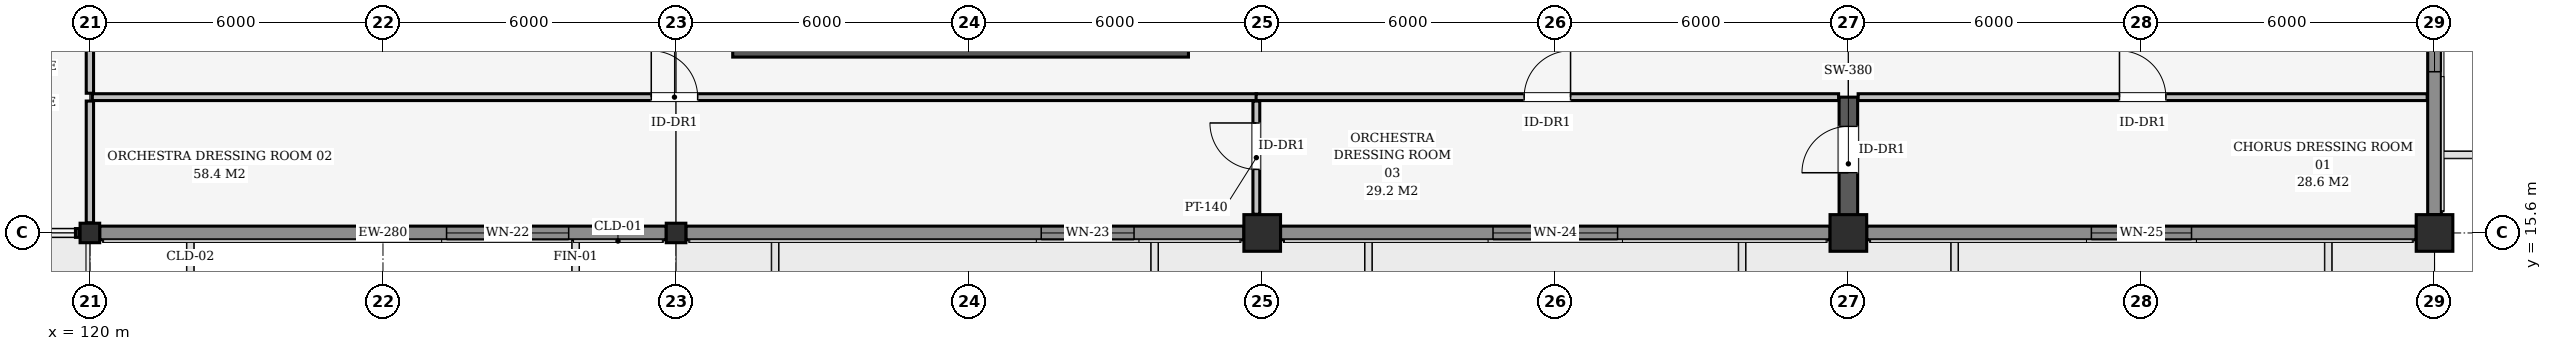
"""IFC4 building model, lengths in metres.
Left out: names, types, materials, properties, quantities, classifications, styles, units other than length and angle.
Written with IfcOpenShell. Run it as: python <this file> out.ifc"""

import sys

from ifc_helpers import new_model, si_unit, direction, frame, frame_2d, origin, origin_2d, place, context, subcontext, project, spatial, rectangle, i_section, extrude, element, fill, save


model = new_model("IFC4")
c1 = context("Model", 3, precision=1e-05, world=origin(), true_north=direction((0.0, 1.0)))
c2 = subcontext(c1, "Body", "Model", "MODEL_VIEW")
j1 = project(units=[si_unit("LENGTHUNIT", "METRE"), si_unit("PLANEANGLEUNIT", "RADIAN")], contexts=[c1])
p1 = place(None, origin())
s1 = spatial("IfcSite", under=j1, at=p1, CompositionType="ELEMENT")
p2 = place(p1, origin())
s2 = spatial("IfcBuilding", under=s1, at=p2, CompositionType="ELEMENT")
p3 = place(p2, frame((0.0, 0.0, 4.8)))
s3 = spatial("IfcBuildingStorey", under=s2, at=p3, CompositionType="ELEMENT", Elevation=4.8)
for number, where, z_axis, x_axis in (
    (1, (120.0, 15.6, 0.0), (0.0, 0.0, 1.0), (1.0, 0.0, 0.0)),
    (2, (132.0, 15.6, 0.0), (0.0, 0.0, 1.0), (1.0, 0.0, 0.0)),
):
    element("IfcColumn", number, at=place(p3, frame(where, z_axis=z_axis, x_axis=x_axis)), inside=s3, PredefinedType="COLUMN", context=c2, shape_type="SweptSolid", body=[
        extrude(i_section(OverallWidth=0.401, OverallDepth=0.399, WebThickness=0.025, FlangeThickness=0.04, at=origin_2d()), origin(), (0.0, 0.0, 1.0), 4.5),
    ])
for number, where, z_axis, x_axis in (
    (3, (144.0, 15.6, 0.0), (0.0, 0.0, 1.0), (1.0, 0.0, 0.0)),
    (4, (156.0, 15.6, 0.0), (0.0, 0.0, 1.0), (1.0, 0.0, 0.0)),
    (5, (168.0, 15.6, 0.0), (0.0, 0.0, 1.0), (1.0, 0.0, 0.0)),
):
    element("IfcColumn", number, at=place(p3, frame(where, z_axis=z_axis, x_axis=x_axis)), inside=s3, PredefinedType="COLUMN", context=c2, shape_type="SweptSolid", body=[
        extrude(rectangle(XDim=0.75, YDim=0.75, at=origin_2d()), origin(), (0.0, 0.0, 1.0), 4.5),
    ])
p4 = place(p3, frame((156.0, 15.65, 0.0), z_axis=(0.0, 0.0, 1.0), x_axis=(0.0, 1.0, 0.0)))
e6 = element("IfcWall", 6, at=p4, inside=s3, PredefinedType="SHEAR", context=c2, shape_type="SweptSolid", body=[
    extrude(rectangle(XDim=2.73, YDim=0.38, at=frame_2d((1.365, 0.0))), origin(), (0.0, 0.0, 1.0), 3.37),
])
p5 = place(p4, frame((1.183, 0.0, 0.0)))
e7 = element("IfcOpeningElement", 7, at=p5, cuts=e6, PredefinedType="OPENING", context=c2, shape_type="SweptSolid", body=[
    extrude(rectangle(XDim=0.95, YDim=2.12, at=frame_2d((0.475, 1.06))), frame((0.0, 0.2, 0.0), z_axis=(0.0, -1.0, 0.0), x_axis=(1.0, 0.0, 0.0)), (0.0, 0.0, 1.0), 0.4),
])
p6 = place(p3, frame((131.8, 15.6, 0.0), z_axis=(0.0, 0.0, 1.0), x_axis=(-1.0, 0.0, 0.0)))
e8 = element("IfcWall", 8, at=p6, inside=s3, PredefinedType="SOLIDWALL", context=c2, shape_type="SweptSolid", body=[
    extrude(rectangle(XDim=11.599, YDim=0.28, at=frame_2d((5.8, 0.0))), origin(), (0.0, 0.0, 1.0), 3.507),
])
p7 = place(p6, frame((1.998, 0.0, 0.85)))
e9 = element("IfcOpeningElement", 9, at=p7, cuts=e8, PredefinedType="OPENING", context=c2, shape_type="SweptSolid", body=[
    extrude(rectangle(XDim=2.5, YDim=1.9, at=frame_2d((1.25, 0.95))), frame((0.0, 0.15, 0.0), z_axis=(0.0, -1.0, 0.0), x_axis=(1.0, 0.0, 0.0)), (0.0, 0.0, 1.0), 0.3),
])
p8 = place(p3, frame((143.625, 15.6, 0.0), z_axis=(0.0, 0.0, 1.0), x_axis=(-1.0, 0.0, 0.0)))
e10 = element("IfcWall", 10, at=p8, inside=s3, PredefinedType="SOLIDWALL", context=c2, shape_type="SweptSolid", body=[
    extrude(rectangle(XDim=11.425, YDim=0.28, at=frame_2d((5.712, 0.0))), origin(), (0.0, 0.0, 1.0), 3.507),
])
p9 = place(p8, frame((2.249, 0.0, 0.85)))
e11 = element("IfcOpeningElement", 11, at=p9, cuts=e10, PredefinedType="OPENING", context=c2, shape_type="SweptSolid", body=[
    extrude(rectangle(XDim=1.9, YDim=1.6, at=frame_2d((0.95, 0.8))), frame((0.0, 0.15, 0.0), z_axis=(0.0, -1.0, 0.0), x_axis=(1.0, 0.0, 0.0)), (0.0, 0.0, 1.0), 0.3),
])
p10 = place(p3, frame((155.625, 15.6, 0.0), z_axis=(0.0, 0.0, 1.0), x_axis=(-1.0, 0.0, 0.0)))
e12 = element("IfcWall", 12, at=p10, inside=s3, PredefinedType="SOLIDWALL", context=c2, shape_type="SweptSolid", body=[
    extrude(rectangle(XDim=11.25, YDim=0.28, at=frame_2d((5.625, 0.0))), origin(), (0.0, 0.0, 1.0), 3.507),
])
p11 = place(p10, frame((4.35, 0.0, 0.85)))
e13 = element("IfcOpeningElement", 13, at=p11, cuts=e12, PredefinedType="OPENING", context=c2, shape_type="SweptSolid", body=[
    extrude(rectangle(XDim=2.55, YDim=1.05, at=frame_2d((1.275, 0.525))), frame((0.0, 0.15, 0.0), z_axis=(0.0, -1.0, 0.0), x_axis=(1.0, 0.0, 0.0)), (0.0, 0.0, 1.0), 0.3),
])
p12 = place(p3, frame((167.625, 15.6, 0.0), z_axis=(0.0, 0.0, 1.0), x_axis=(-1.0, 0.0, 0.0)))
e14 = element("IfcWall", 14, at=p12, inside=s3, PredefinedType="SOLIDWALL", context=c2, shape_type="SweptSolid", body=[
    extrude(rectangle(XDim=11.25, YDim=0.28, at=frame_2d((5.625, 0.0))), origin(), (0.0, 0.0, 1.0), 3.507),
])
p13 = place(p12, frame((4.6, 0.0, 0.85)))
e15 = element("IfcOpeningElement", 15, at=p13, cuts=e14, PredefinedType="OPENING", context=c2, shape_type="SweptSolid", body=[
    extrude(rectangle(XDim=2.05, YDim=1.5, at=frame_2d((1.025, 0.75))), frame((0.0, 0.15, 0.0), z_axis=(0.0, -1.0, 0.0), x_axis=(1.0, 0.0, 0.0)), (0.0, 0.0, 1.0), 0.3),
])
p14 = place(p3, frame((168.0, 23.625, 0.0), z_axis=(0.0, 0.0, 1.0), x_axis=(0.0, -1.0, 0.0)))
e16 = element("IfcWall", 16, at=p14, inside=s3, PredefinedType="SOLIDWALL", context=c2, shape_type="SweptSolid", body=[
    extrude(rectangle(XDim=7.65, YDim=0.28, at=frame_2d((3.825, 0.0))), origin(), (0.0, 0.0, 1.0), 3.588),
])
p15 = place(p14, frame((2.925, 0.0, 0.85)))
e17 = element("IfcOpeningElement", 17, at=p15, cuts=e16, PredefinedType="OPENING", context=c2, shape_type="SweptSolid", body=[
    extrude(rectangle(XDim=1.8, YDim=1.65, at=frame_2d((0.9, 0.825))), frame((0.0, 0.15, 0.0), z_axis=(0.0, -1.0, 0.0), x_axis=(1.0, 0.0, 0.0)), (0.0, 0.0, 1.0), 0.3),
])
p16 = place(p3, frame((133.16, 19.345, 0.0), z_axis=(0.0, 0.0, 1.0), x_axis=(1.0, 0.0, 0.0)))
e18 = element("IfcWall", 18, at=p16, inside=s3, PredefinedType="SHEAR", context=c2, shape_type="SweptSolid", body=[
    extrude(rectangle(XDim=9.33, YDim=0.29, at=frame_2d((4.665, 0.0))), origin(), (0.0, 0.0, 1.0), 4.22),
])
p17 = place(p3, frame((120.05, 18.38, 0.0), z_axis=(0.0, 0.0, 1.0), x_axis=(1.0, 0.0, 0.0)))
e19 = element("IfcWall", 19, at=p17, inside=s3, PredefinedType="PARTITIONING", context=c2, shape_type="SweptSolid", body=[
    extrude(rectangle(XDim=23.835, YDim=0.14, at=frame_2d((11.917, 0.0))), origin(), (0.0, 0.0, 1.0), 4.2),
])
p18 = place(p17, frame((11.442, 0.0, 0.0)))
e20 = element("IfcOpeningElement", 20, at=p18, cuts=e19, PredefinedType="OPENING", context=c2, shape_type="SweptSolid", body=[
    extrude(rectangle(XDim=0.95, YDim=2.12, at=frame_2d((0.475, 1.06))), frame((0.0, 0.08, 0.0), z_axis=(0.0, -1.0, 0.0), x_axis=(1.0, 0.0, 0.0)), (0.0, 0.0, 1.0), 0.16),
])
p19 = place(p3, frame((143.875, 18.38, 0.0), z_axis=(0.0, 0.0, 1.0), x_axis=(1.0, 0.0, 0.0)))
e21 = element("IfcWall", 21, at=p19, inside=s3, PredefinedType="PARTITIONING", context=c2, shape_type="SweptSolid", body=[
    extrude(rectangle(XDim=11.925, YDim=0.14, at=frame_2d((5.962, 0.0))), origin(), (0.0, 0.0, 1.0), 4.2),
])
p20 = place(p19, frame((5.488, 0.0, 0.0)))
e22 = element("IfcOpeningElement", 22, at=p20, cuts=e21, PredefinedType="OPENING", context=c2, shape_type="SweptSolid", body=[
    extrude(rectangle(XDim=0.95, YDim=2.12, at=frame_2d((0.475, 1.06))), frame((0.0, 0.08, 0.0), z_axis=(0.0, -1.0, 0.0), x_axis=(1.0, 0.0, 0.0)), (0.0, 0.0, 1.0), 0.16),
])
p21 = place(p3, frame((156.2, 18.38, 0.0), z_axis=(0.0, 0.0, 1.0), x_axis=(1.0, 0.0, 0.0)))
e23 = element("IfcWall", 23, at=p21, inside=s3, PredefinedType="PARTITIONING", context=c2, shape_type="SweptSolid", body=[
    extrude(rectangle(XDim=11.65, YDim=0.14, at=frame_2d((5.825, 0.0))), origin(), (0.0, 0.0, 1.0), 4.2),
])
p22 = place(p21, frame((5.35, 0.0, 0.0)))
e24 = element("IfcOpeningElement", 24, at=p22, cuts=e23, PredefinedType="OPENING", context=c2, shape_type="SweptSolid", body=[
    extrude(rectangle(XDim=0.95, YDim=2.12, at=frame_2d((0.475, 1.06))), frame((0.0, 0.08, 0.0), z_axis=(0.0, -1.0, 0.0), x_axis=(1.0, 0.0, 0.0)), (0.0, 0.0, 1.0), 0.16),
])
p23 = place(p3, frame((120.0, 18.46, 0.0), z_axis=(0.0, 0.0, 1.0), x_axis=(0.0, 1.0, 0.0)))
e25 = element("IfcWall", 25, at=p23, inside=s3, PredefinedType="PARTITIONING", context=c2, shape_type="SweptSolid", body=[
    extrude(rectangle(XDim=5.335, YDim=0.15, at=frame_2d((2.667, 0.0))), origin(), (0.0, 0.0, 1.0), 3.588),
])
p24 = place(p23, frame((2.198, 0.0, 0.0)))
e26 = element("IfcOpeningElement", 26, at=p24, cuts=e25, PredefinedType="OPENING", context=c2, shape_type="SweptSolid", body=[
    extrude(rectangle(XDim=0.94, YDim=2.1, at=frame_2d((0.47, 1.05))), frame((0.0, 0.085, 0.0), z_axis=(0.0, -1.0, 0.0), x_axis=(1.0, 0.0, 0.0)), (0.0, 0.0, 1.0), 0.17),
])
p25 = place(p3, frame((143.88, 15.983, 0.0), z_axis=(0.0, 0.0, 1.0), x_axis=(0.0, 1.0, 0.0)))
e27 = element("IfcWall", 27, at=p25, inside=s3, PredefinedType="PARTITIONING", context=c2, shape_type="SweptSolid", body=[
    extrude(rectangle(XDim=2.317, YDim=0.14, at=frame_2d((1.159, 0.0))), origin(), (0.0, 0.0, 1.0), 3.589),
])
p26 = place(p25, frame((0.918, 0.0, 0.0)))
e28 = element("IfcOpeningElement", 28, at=p26, cuts=e27, PredefinedType="OPENING", context=c2, shape_type="SweptSolid", body=[
    extrude(rectangle(XDim=0.95, YDim=2.12, at=frame_2d((0.475, 1.06))), frame((0.0, 0.08, 0.0), z_axis=(0.0, -1.0, 0.0), x_axis=(1.0, 0.0, 0.0)), (0.0, 0.0, 1.0), 0.16),
])
p27 = place(p3, frame((120.0, 15.808, 0.0), z_axis=(0.0, 0.0, 1.0), x_axis=(0.0, 1.0, 0.0)))
e29 = element("IfcWall", 29, at=p27, inside=s3, PredefinedType="PARTITIONING", context=c2, shape_type="SweptSolid", body=[
    extrude(rectangle(XDim=2.492, YDim=0.15, at=frame_2d((1.246, 0.0))), origin(), (0.0, 0.0, 1.0), 3.588),
])
p28 = place(p7, origin())
e30 = element("IfcWindow", 30, at=p28, inside=s3, PartitioningType="SINGLE_PANEL", PredefinedType="WINDOW", context=c2, shape_type="SweptSolid", body=[
    extrude(rectangle(XDim=2.5, YDim=1.9, at=frame_2d((1.25, 0.95))), frame((0.0, 0.03, 0.0), z_axis=(0.0, -1.0, 0.0), x_axis=(1.0, 0.0, 0.0)), (0.0, 0.0, 1.0), 0.06),
])
fill(e9, e30)
p29 = place(p9, origin())
e31 = element("IfcWindow", 31, at=p29, inside=s3, PartitioningType="SINGLE_PANEL", PredefinedType="WINDOW", context=c2, shape_type="SweptSolid", body=[
    extrude(rectangle(XDim=1.9, YDim=1.6, at=frame_2d((0.95, 0.8))), frame((0.0, 0.03, 0.0), z_axis=(0.0, -1.0, 0.0), x_axis=(1.0, 0.0, 0.0)), (0.0, 0.0, 1.0), 0.06),
])
fill(e11, e31)
p30 = place(p11, origin())
e32 = element("IfcWindow", 32, at=p30, inside=s3, PartitioningType="SINGLE_PANEL", PredefinedType="WINDOW", context=c2, shape_type="SweptSolid", body=[
    extrude(rectangle(XDim=2.55, YDim=1.05, at=frame_2d((1.275, 0.525))), frame((0.0, 0.03, 0.0), z_axis=(0.0, -1.0, 0.0), x_axis=(1.0, 0.0, 0.0)), (0.0, 0.0, 1.0), 0.06),
])
fill(e13, e32)
p31 = place(p13, origin())
e33 = element("IfcWindow", 33, at=p31, inside=s3, PartitioningType="SINGLE_PANEL", PredefinedType="WINDOW", context=c2, shape_type="SweptSolid", body=[
    extrude(rectangle(XDim=2.05, YDim=1.5, at=frame_2d((1.025, 0.75))), frame((0.0, 0.03, 0.0), z_axis=(0.0, -1.0, 0.0), x_axis=(1.0, 0.0, 0.0)), (0.0, 0.0, 1.0), 0.06),
])
fill(e15, e33)
p32 = place(p15, origin())
e34 = element("IfcWindow", 34, at=p32, inside=s3, PartitioningType="SINGLE_PANEL", PredefinedType="WINDOW", context=c2, shape_type="SweptSolid", body=[
    extrude(rectangle(XDim=1.8, YDim=1.65, at=frame_2d((0.9, 0.825))), frame((0.0, 0.03, 0.0), z_axis=(0.0, -1.0, 0.0), x_axis=(1.0, 0.0, 0.0)), (0.0, 0.0, 1.0), 0.06),
])
fill(e17, e34)
p33 = place(p18, origin())
e35 = element("IfcDoor", 35, at=p33, inside=s3, OperationType="SINGLE_SWING_LEFT", PredefinedType="DOOR", context=c2, shape_type="SweptSolid", body=[
    extrude(rectangle(XDim=0.95, YDim=2.12, at=frame_2d((0.475, 1.06))), frame((0.0, 0.025, 0.0), z_axis=(0.0, -1.0, 0.0), x_axis=(1.0, 0.0, 0.0)), (0.0, 0.0, 1.0), 0.05),
])
fill(e20, e35)
p34 = place(p20, origin())
e36 = element("IfcDoor", 36, at=p34, inside=s3, OperationType="SINGLE_SWING_RIGHT", PredefinedType="DOOR", context=c2, shape_type="SweptSolid", body=[
    extrude(rectangle(XDim=0.95, YDim=2.12, at=frame_2d((0.475, 1.06))), frame((0.0, 0.025, 0.0), z_axis=(0.0, -1.0, 0.0), x_axis=(1.0, 0.0, 0.0)), (0.0, 0.0, 1.0), 0.05),
])
fill(e22, e36)
p35 = place(p22, origin())
e37 = element("IfcDoor", 37, at=p35, inside=s3, OperationType="SINGLE_SWING_LEFT", PredefinedType="DOOR", context=c2, shape_type="SweptSolid", body=[
    extrude(rectangle(XDim=0.95, YDim=2.12, at=frame_2d((0.475, 1.06))), frame((0.0, 0.025, 0.0), z_axis=(0.0, -1.0, 0.0), x_axis=(1.0, 0.0, 0.0)), (0.0, 0.0, 1.0), 0.05),
])
fill(e24, e37)
p36 = place(p26, origin())
e38 = element("IfcDoor", 38, at=p36, inside=s3, OperationType="SINGLE_SWING_RIGHT", PredefinedType="DOOR", context=c2, shape_type="SweptSolid", body=[
    extrude(rectangle(XDim=0.95, YDim=2.12, at=frame_2d((0.475, 1.06))), frame((0.0, 0.025, 0.0), z_axis=(0.0, -1.0, 0.0), x_axis=(1.0, 0.0, 0.0)), (0.0, 0.0, 1.0), 0.05),
])
fill(e28, e38)
p37 = place(p5, origin())
e39 = element("IfcDoor", 39, at=p37, inside=s3, OperationType="SINGLE_SWING_LEFT", PredefinedType="DOOR", context=c2, shape_type="SweptSolid", body=[
    extrude(rectangle(XDim=0.95, YDim=2.12, at=frame_2d((0.475, 1.06))), frame((0.0, 0.025, 0.0), z_axis=(0.0, -1.0, 0.0), x_axis=(1.0, 0.0, 0.0)), (0.0, 0.0, 1.0), 0.05),
])
fill(e7, e39)
save(model, sys.argv[1])
